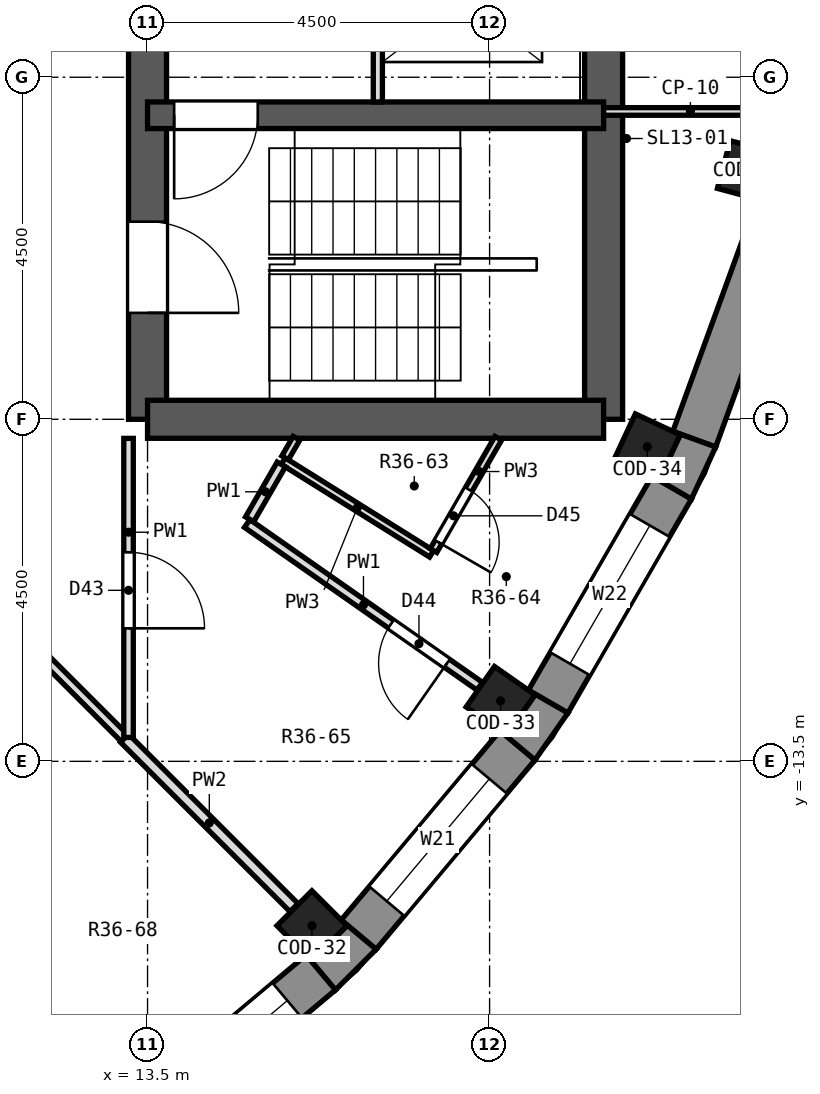
"""IFC4 building model, lengths in metres.
Left out: names, types, materials, properties, quantities, classifications, styles, units other than length and angle.
Written with IfcOpenShell. Run it as: python <this file> out.ifc"""

import sys

from ifc_helpers import new_model, si_unit, direction, frame, frame_2d, origin, origin_2d, place, context, subcontext, project, spatial, polyline, rectangle, outline, extrude, element, fill, save


model = new_model("IFC4")
c1 = context("Model", 3, precision=1e-05, world=origin(), true_north=direction((0.0, 1.0)))
c2 = subcontext(c1, "Body", "Model", "MODEL_VIEW")
j1 = project(units=[si_unit("LENGTHUNIT", "METRE"), si_unit("PLANEANGLEUNIT", "RADIAN")], contexts=[c1])
p1 = place(None, origin())
s1 = spatial("IfcSite", under=j1, at=p1, CompositionType="ELEMENT")
p2 = place(p1, origin())
s2 = spatial("IfcBuilding", under=s1, at=p2, CompositionType="ELEMENT")
p3 = place(p2, frame((0.0, 0.0, 259.4)))
s3 = spatial("IfcBuildingStorey", under=s2, at=p3, CompositionType="ELEMENT", Elevation=259.4)
for number, where, z_axis, x_axis in (
    (1, (15.662, -15.662, 0.0), (0.0, 0.0, 1.0), (0.707, -0.707, 0.0)),
    (2, (18.144, -12.705, 0.0), (0.0, 0.0, 1.0), (0.819, -0.574, 0.0)),
    (3, (20.075, -9.361, 0.0), (0.0, 0.0, 1.0), (0.906, -0.423, 0.0)),
    (4, (21.395, -5.733, 0.0), (0.0, 0.0, 1.0), (0.966, -0.259, 0.0)),
):
    element("IfcColumn", number, at=place(p3, frame(where, z_axis=z_axis, x_axis=x_axis)), inside=s3, PredefinedType="COLUMN", context=c2, shape_type="SweptSolid", body=[
        extrude(rectangle(XDim=0.65, YDim=0.65, at=origin_2d()), origin(), (0.0, 0.0, 1.0), 3.3),
    ])
p4 = place(p3, frame((13.5, -9.0, 0.0), z_axis=(0.0, 0.0, 1.0), x_axis=(0.0, 1.0, 0.0)))
e5 = element("IfcWall", 5, at=p4, inside=s3, PredefinedType="SHEAR", context=c2, shape_type="SweptSolid", body=[
    extrude(rectangle(XDim=18.0, YDim=0.5, at=frame_2d((9.0, 0.0))), origin(), (0.0, 0.0, 1.0), 3.3),
])
p5 = place(p4, frame((15.4, 0.0, 0.0)))
e6 = element("IfcOpeningElement", 6, at=p5, cuts=e5, PredefinedType="OPENING", context=c2, shape_type="SweptSolid", body=[
    extrude(rectangle(XDim=1.2, YDim=2.1, at=frame_2d((0.6, 1.05))), frame((0.0, 0.262, 0.0), z_axis=(0.0, -1.0, 0.0), x_axis=(1.0, 0.0, 0.0)), (0.0, 0.0, 1.0), 0.524),
])
p6 = place(p4, frame((1.4, 0.0, 0.0)))
e7 = element("IfcOpeningElement", 7, at=p6, cuts=e5, PredefinedType="OPENING", context=c2, shape_type="SweptSolid", body=[
    extrude(rectangle(XDim=1.2, YDim=2.1, at=frame_2d((0.6, 1.05))), frame((0.0, 0.262, 0.0), z_axis=(0.0, -1.0, 0.0), x_axis=(1.0, 0.0, 0.0)), (0.0, 0.0, 1.0), 0.524),
])
p7 = place(p4, frame((7.5, 0.0, 0.0)))
e8 = element("IfcOpeningElement", 8, at=p7, cuts=e5, PredefinedType="OPENING", context=c2, shape_type="SweptSolid", body=[
    extrude(rectangle(XDim=3.0, YDim=2.4, at=frame_2d((1.5, 1.2))), frame((0.0, 0.262, 0.0), z_axis=(0.0, -1.0, 0.0), x_axis=(1.0, 0.0, 0.0)), (0.0, 0.0, 1.0), 0.524),
])
p8 = place(p3, frame((19.5, -9.0, 0.0), z_axis=(0.0, 0.0, 1.0), x_axis=(0.0, 1.0, 0.0)))
e9 = element("IfcWall", 9, at=p8, inside=s3, PredefinedType="SHEAR", context=c2, shape_type="SweptSolid", body=[
    extrude(rectangle(XDim=18.0, YDim=0.5, at=frame_2d((9.0, 0.0))), origin(), (0.0, 0.0, 1.0), 3.3),
])
p9 = place(p8, frame((9.45, 0.0, 0.0)))
e10 = element("IfcOpeningElement", 10, at=p9, cuts=e9, PredefinedType="OPENING", context=c2, shape_type="SweptSolid", body=[
    extrude(rectangle(XDim=0.9, YDim=2.1, at=frame_2d((0.45, 1.05))), frame((0.0, 0.262, 0.0), z_axis=(0.0, -1.0, 0.0), x_axis=(1.0, 0.0, 0.0)), (0.0, 0.0, 1.0), 0.524),
])
p10 = place(p8, frame((7.65, 0.0, 0.0)))
e11 = element("IfcOpeningElement", 11, at=p10, cuts=e9, PredefinedType="OPENING", context=c2, shape_type="SweptSolid", body=[
    extrude(rectangle(XDim=0.9, YDim=2.1, at=frame_2d((0.45, 1.05))), frame((0.0, 0.262, 0.0), z_axis=(0.0, -1.0, 0.0), x_axis=(1.0, 0.0, 0.0)), (0.0, 0.0, 1.0), 0.524),
])
p11 = place(p3, frame((13.5, -9.0, 0.0), z_axis=(0.0, 0.0, 1.0), x_axis=(1.0, 0.0, 0.0)))
e12 = element("IfcWall", 12, at=p11, inside=s3, PredefinedType="SHEAR", context=c2, shape_type="SweptSolid", body=[
    extrude(rectangle(XDim=6.0, YDim=0.5, at=frame_2d((3.0, 0.0))), origin(), (0.0, 0.0, 1.0), 3.3),
])
p12 = place(p3, frame((13.5, -5.0, 0.0), z_axis=(0.0, 0.0, 1.0), x_axis=(1.0, 0.0, 0.0)))
e13 = element("IfcWall", 13, at=p12, inside=s3, PredefinedType="SHEAR", context=c2, shape_type="SweptSolid", body=[
    extrude(rectangle(XDim=6.0, YDim=0.35, at=frame_2d((3.0, 0.0))), origin(), (0.0, 0.0, 1.0), 3.3),
])
p13 = place(p12, frame((0.35, 0.0, 0.0)))
e14 = element("IfcOpeningElement", 14, at=p13, cuts=e13, PredefinedType="OPENING", context=c2, shape_type="SweptSolid", body=[
    extrude(rectangle(XDim=1.1, YDim=2.1, at=frame_2d((0.55, 1.05))), frame((0.0, 0.187, 0.0), z_axis=(0.0, -1.0, 0.0), x_axis=(1.0, 0.0, 0.0)), (0.0, 0.0, 1.0), 0.374),
])
p14 = place(p3, frame((13.29, -18.367, 0.0), z_axis=(0.0, 0.0, 1.0), x_axis=(0.766056773982, 0.64277291405, 0.0)))
e15 = element("IfcWall", 15, at=p14, inside=s3, PredefinedType="SOLIDWALL", context=c2, shape_type="SweptSolid", body=[
    extrude(rectangle(XDim=3.252, YDim=0.6, at=frame_2d((1.626, 0.0))), origin(), (0.0, 0.0, 1.0), 2.9),
])
p15 = place(p14, frame((0.576, 0.0, 0.9)))
e16 = element("IfcOpeningElement", 16, at=p15, cuts=e15, PredefinedType="OPENING", context=c2, shape_type="SweptSolid", body=[
    extrude(rectangle(XDim=2.1, YDim=1.8, at=frame_2d((1.05, 0.9))), frame((0.0, 0.312, 0.0), z_axis=(0.0, -1.0, 0.0), x_axis=(1.0, 0.0, 0.0)), (0.0, 0.0, 1.0), 0.624),
])
p16 = place(p3, frame((16.277, -15.781, 0.0), z_axis=(0.0, 0.0, 1.0), x_axis=(0.64277291405, 0.766056773982, 0.0)))
e17 = element("IfcWall", 17, at=p16, inside=s3, PredefinedType="SOLIDWALL", context=c2, shape_type="SweptSolid", body=[
    extrude(rectangle(XDim=3.252, YDim=0.6, at=frame_2d((1.626, 0.0))), origin(), (0.0, 0.0, 1.0), 2.9),
])
p17 = place(p16, frame((0.576, 0.0, 0.9)))
e18 = element("IfcOpeningElement", 18, at=p17, cuts=e17, PredefinedType="OPENING", context=c2, shape_type="SweptSolid", body=[
    extrude(rectangle(XDim=2.1, YDim=1.8, at=frame_2d((1.05, 0.9))), frame((0.0, 0.312, 0.0), z_axis=(0.0, -1.0, 0.0), x_axis=(1.0, 0.0, 0.0)), (0.0, 0.0, 1.0), 0.624),
])
p18 = place(p3, frame((18.77, -12.714, 0.0), z_axis=(0.0, 0.0, 1.0), x_axis=(0.500014901547, 0.866016800201, 0.0)))
e19 = element("IfcWall", 19, at=p18, inside=s3, PredefinedType="SOLIDWALL", context=c2, shape_type="SweptSolid", body=[
    extrude(rectangle(XDim=3.252, YDim=0.6, at=frame_2d((1.626, 0.0))), origin(), (0.0, 0.0, 1.0), 2.9),
])
p19 = place(p18, frame((0.576, 0.0, 0.9)))
e20 = element("IfcOpeningElement", 20, at=p19, cuts=e19, PredefinedType="OPENING", context=c2, shape_type="SweptSolid", body=[
    extrude(rectangle(XDim=2.1, YDim=1.8, at=frame_2d((1.05, 0.9))), frame((0.0, 0.312, 0.0), z_axis=(0.0, -1.0, 0.0), x_axis=(1.0, 0.0, 0.0)), (0.0, 0.0, 1.0), 0.624),
])
p20 = place(p3, frame((20.693, -9.262, 0.0), z_axis=(0.0, 0.0, 1.0), x_axis=(0.342056509473, 0.939679383794, 0.0)))
e21 = element("IfcWall", 21, at=p20, inside=s3, PredefinedType="SOLIDWALL", context=c2, shape_type="SweptSolid", body=[
    extrude(rectangle(XDim=3.252, YDim=0.6, at=frame_2d((1.626, 0.0))), origin(), (0.0, 0.0, 1.0), 2.9),
])
p21 = place(p3, origin())
e22 = element("IfcWall", 22, at=p21, inside=s3, PredefinedType="SOLIDWALL", context=c2, shape_type="SweptSolid", body=[
    extrude(outline(polyline([(16.507, -15.973), (16.047, -15.588), (16.122, -15.662), (15.662, -16.122), (15.588, -16.047), (15.973, -16.507), (16.507, -15.973)])), origin(), (0.0, 0.0, 1.0), 2.9),
])
p22 = place(p3, origin())
e23 = element("IfcWall", 23, at=p22, inside=s3, PredefinedType="SOLIDWALL", context=c2, shape_type="SweptSolid", body=[
    extrude(outline(polyline([(19.03, -12.864), (18.51, -12.564), (18.597, -12.625), (18.224, -13.157), (18.137, -13.097), (18.597, -13.482), (19.03, -12.864)])), origin(), (0.0, 0.0, 1.0), 2.9),
])
p23 = place(p3, origin())
e24 = element("IfcWall", 24, at=p23, inside=s3, PredefinedType="SOLIDWALL", context=c2, shape_type="SweptSolid", body=[
    extrude(outline(polyline([(20.656, -10.048), (20.975, -9.364), (20.411, -9.159), (20.507, -9.204), (20.232, -9.793), (20.136, -9.748), (20.656, -10.048)])), origin(), (0.0, 0.0, 1.0), 2.9),
])
p24 = place(p3, frame((8.275, -11.818, 0.0), z_axis=(0.0, 0.0, 1.0), x_axis=(0.573597629831, -0.819137204046, 0.0)))
e25 = element("IfcWall", 25, at=p24, inside=s3, PredefinedType="PARTITIONING", context=c2, shape_type="SweptSolid", body=[
    extrude(rectangle(XDim=7.388, YDim=0.1, at=frame_2d((3.694, 0.0))), origin(), (0.0, 0.0, 1.0), 2.9),
])
p25 = place(p24, frame((3.504, 0.0, 0.0)))
e26 = element("IfcOpeningElement", 26, at=p25, cuts=e25, PredefinedType="OPENING", context=c2, shape_type="SweptSolid", body=[
    extrude(rectangle(XDim=0.9, YDim=2.1, at=frame_2d((0.45, 1.05))), frame((0.0, 0.062, 0.0), z_axis=(0.0, -1.0, 0.0), x_axis=(1.0, 0.0, 0.0)), (0.0, 0.0, 1.0), 0.124),
])
p26 = place(p3, frame((10.477, -10.475, 0.0), z_axis=(0.0, 0.0, 1.0), x_axis=(0.707106781187, -0.707106781187, 0.0)))
e27 = element("IfcWall", 27, at=p26, inside=s3, PredefinedType="PARTITIONING", context=c2, shape_type="SweptSolid", body=[
    extrude(rectangle(XDim=3.848, YDim=0.125, at=frame_2d((1.924, 0.0))), origin(), (0.0, 0.0, 1.0), 2.9),
])
p27 = place(p3, frame((13.198, -13.196, 0.0), z_axis=(0.0, 0.0, 1.0), x_axis=(0.707261695581, -0.706951832845, 0.0)))
e28 = element("IfcWall", 28, at=p27, inside=s3, PredefinedType="PARTITIONING", context=c2, shape_type="SweptSolid", body=[
    extrude(rectangle(XDim=3.152, YDim=0.15, at=frame_2d((1.576, 0.0))), origin(), (0.0, 0.0, 1.0), 2.9),
])
p28 = place(p3, frame((14.811, -10.371, 0.0), z_axis=(0.0, 0.0, 1.0), x_axis=(0.819345561084, -0.57329996645, 0.0)))
e29 = element("IfcWall", 29, at=p28, inside=s3, PredefinedType="PARTITIONING", context=c2, shape_type="SweptSolid", body=[
    extrude(rectangle(XDim=3.734, YDim=0.125, at=frame_2d((1.867, 0.0))), origin(), (0.0, 0.0, 1.0), 2.9),
])
p29 = place(p28, frame((2.308, 0.0, 0.0)))
e30 = element("IfcOpeningElement", 30, at=p29, cuts=e29, PredefinedType="OPENING", context=c2, shape_type="SweptSolid", body=[
    extrude(rectangle(XDim=0.9, YDim=2.1, at=frame_2d((0.45, 1.05))), frame((0.0, 0.074, 0.0), z_axis=(0.0, -1.0, 0.0), x_axis=(1.0, 0.0, 0.0)), (0.0, 0.0, 1.0), 0.149),
])
p30 = place(p3, frame((15.285, -9.55, 0.0), z_axis=(0.0, 0.0, 1.0), x_axis=(0.848022135911, -0.529960807047, 0.0)))
e31 = element("IfcWall", 31, at=p30, inside=s3, PredefinedType="PARTITIONING", context=c2, shape_type="SweptSolid", body=[
    extrude(rectangle(XDim=2.302, YDim=0.1, at=frame_2d((1.151, 0.0))), origin(), (0.0, 0.0, 1.0), 2.9),
])
p31 = place(p3, frame((15.31, -9.507, 0.0), z_axis=(0.0, 0.0, 1.0), x_axis=(0.503206273965, 0.864166329963, 0.0)))
e32 = element("IfcWall", 32, at=p31, inside=s3, PredefinedType="PARTITIONING", context=c2, shape_type="SweptSolid", body=[
    extrude(rectangle(XDim=0.297, YDim=0.1, at=frame_2d((0.148, 0.0))), origin(), (0.0, 0.0, 1.0), 2.9),
])
p32 = place(p3, frame((17.262, -10.727, 0.0), z_axis=(0.0, 0.0, 1.0), x_axis=(0.499743113806, 0.866173666307, 0.0)))
e33 = element("IfcWall", 33, at=p32, inside=s3, PredefinedType="PARTITIONING", context=c2, shape_type="SweptSolid", body=[
    extrude(rectangle(XDim=1.705, YDim=0.1, at=frame_2d((0.853, 0.0))), origin(), (0.0, 0.0, 1.0), 2.9),
])
p33 = place(p32, frame((0.127, 0.0, 0.0)))
e34 = element("IfcOpeningElement", 34, at=p33, cuts=e33, PredefinedType="OPENING", context=c2, shape_type="SweptSolid", body=[
    extrude(rectangle(XDim=0.8, YDim=2.1, at=frame_2d((0.4, 1.05))), frame((0.0, 0.062, 0.0), z_axis=(0.0, -1.0, 0.0), x_axis=(1.0, 0.0, 0.0)), (0.0, 0.0, 1.0), 0.124),
])
p34 = place(p3, frame((14.843, -10.315, 0.0), z_axis=(0.0, 0.0, 1.0), x_axis=(0.499950631041, 0.86605390509, 0.0)))
e35 = element("IfcWall", 35, at=p34, inside=s3, PredefinedType="PARTITIONING", context=c2, shape_type="SweptSolid", body=[
    extrude(rectangle(XDim=0.833, YDim=0.125, at=frame_2d((0.417, 0.0))), origin(), (0.0, 0.0, 1.0), 2.9),
])
p35 = place(p3, frame((13.25, -13.186, 0.0), z_axis=(0.0, 0.0, 1.0), x_axis=(0.0, 1.0, 0.0)))
e36 = element("IfcWall", 36, at=p35, inside=s3, PredefinedType="PARTITIONING", context=c2, shape_type="SweptSolid", body=[
    extrude(rectangle(XDim=3.935, YDim=0.125, at=frame_2d((1.967, 0.0))), origin(), (0.0, 0.0, 1.0), 2.9),
])
p36 = place(p35, frame((1.436, 0.0, 0.0)))
e37 = element("IfcOpeningElement", 37, at=p36, cuts=e36, PredefinedType="OPENING", context=c2, shape_type="SweptSolid", body=[
    extrude(rectangle(XDim=1.0, YDim=2.1, at=frame_2d((0.5, 1.05))), frame((0.0, 0.074, 0.0), z_axis=(0.0, -1.0, 0.0), x_axis=(1.0, 0.0, 0.0)), (0.0, 0.0, 1.0), 0.149),
])
p37 = place(p3, frame((19.5, -4.95, 0.0), z_axis=(0.0, 0.0, 1.0), x_axis=(1.0, 0.0, 0.0)))
e38 = element("IfcWall", 38, at=p37, inside=s3, PredefinedType="PARTITIONING", context=c2, shape_type="SweptSolid", body=[
    extrude(rectangle(XDim=2.284, YDim=0.1, at=frame_2d((1.142, 0.0))), origin(), (0.0, 0.0, 1.0), 2.9),
])
p38 = place(p3, frame((16.53, -4.825, 0.0), z_axis=(0.0, 0.0, 1.0), x_axis=(0.0, 1.0, 0.0)))
e39 = element("IfcWall", 39, at=p38, inside=s3, PredefinedType="PARTITIONING", context=c2, shape_type="SweptSolid", body=[
    extrude(rectangle(XDim=2.65, YDim=0.12, at=frame_2d((1.325, 0.0))), origin(), (0.0, 0.0, 1.0), 2.9),
])
p39 = place(p38, frame((0.775, 0.0, 0.0)))
e40 = element("IfcOpeningElement", 40, at=p39, cuts=e39, PredefinedType="OPENING", context=c2, shape_type="SweptSolid", body=[
    extrude(rectangle(XDim=1.1, YDim=2.1, at=frame_2d((0.55, 1.05))), frame((0.0, 0.072, 0.0), z_axis=(0.0, -1.0, 0.0), x_axis=(1.0, 0.0, 0.0)), (0.0, 0.0, 1.0), 0.144),
])
p40 = place(p15, origin())
e41 = element("IfcWindow", 41, at=p40, inside=s3, PartitioningType="SINGLE_PANEL", PredefinedType="WINDOW", context=c2, shape_type="SweptSolid", body=[
    extrude(rectangle(XDim=2.1, YDim=1.8, at=frame_2d((1.05, 0.9))), frame((0.0, 0.18, 0.0), z_axis=(0.0, -1.0, 0.0), x_axis=(1.0, 0.0, 0.0)), (0.0, 0.0, 1.0), 0.06),
])
fill(e16, e41)
p41 = place(p17, origin())
e42 = element("IfcWindow", 42, at=p41, inside=s3, PartitioningType="SINGLE_PANEL", PredefinedType="WINDOW", context=c2, shape_type="SweptSolid", body=[
    extrude(rectangle(XDim=2.1, YDim=1.8, at=frame_2d((1.05, 0.9))), frame((0.0, 0.18, 0.0), z_axis=(0.0, -1.0, 0.0), x_axis=(1.0, 0.0, 0.0)), (0.0, 0.0, 1.0), 0.06),
])
fill(e18, e42)
p42 = place(p19, origin())
e43 = element("IfcWindow", 43, at=p42, inside=s3, PartitioningType="SINGLE_PANEL", PredefinedType="WINDOW", context=c2, shape_type="SweptSolid", body=[
    extrude(rectangle(XDim=2.1, YDim=1.8, at=frame_2d((1.05, 0.9))), frame((0.0, 0.18, 0.0), z_axis=(0.0, -1.0, 0.0), x_axis=(1.0, 0.0, 0.0)), (0.0, 0.0, 1.0), 0.06),
])
fill(e20, e43)
p43 = place(p36, frame((1.0, 0.0, 0.0), z_axis=(0.0, 0.0, 1.0), x_axis=(-1.0, 0.0, 0.0)))
e44 = element("IfcDoor", 44, at=p43, inside=s3, OperationType="SINGLE_SWING_RIGHT", PredefinedType="DOOR", context=c2, shape_type="SweptSolid", body=[
    extrude(rectangle(XDim=1.0, YDim=2.1, at=frame_2d((0.5, 1.05))), frame((0.0, 0.025, 0.0), z_axis=(0.0, -1.0, 0.0), x_axis=(1.0, 0.0, 0.0)), (0.0, 0.0, 1.0), 0.05),
])
fill(e37, e44)
p44 = place(p29, frame((0.9, 0.0, 0.0), z_axis=(0.0, 0.0, 1.0), x_axis=(-1.0, 0.0, 0.0)))
e45 = element("IfcDoor", 45, at=p44, inside=s3, OperationType="SINGLE_SWING_LEFT", PredefinedType="DOOR", context=c2, shape_type="SweptSolid", body=[
    extrude(rectangle(XDim=0.9, YDim=2.1, at=frame_2d((0.45, 1.05))), frame((0.0, 0.025, 0.0), z_axis=(0.0, -1.0, 0.0), x_axis=(1.0, 0.0, 0.0)), (0.0, 0.0, 1.0), 0.05),
])
fill(e30, e45)
p45 = place(p33, frame((0.8, 0.0, 0.0), z_axis=(0.0, 0.0, 1.0), x_axis=(-1.0, 0.0, 0.0)))
e46 = element("IfcDoor", 46, at=p45, inside=s3, OperationType="SINGLE_SWING_RIGHT", PredefinedType="DOOR", context=c2, shape_type="SweptSolid", body=[
    extrude(rectangle(XDim=0.8, YDim=2.1, at=frame_2d((0.4, 1.05))), frame((0.0, 0.025, 0.0), z_axis=(0.0, -1.0, 0.0), x_axis=(1.0, 0.0, 0.0)), (0.0, 0.0, 1.0), 0.05),
])
fill(e34, e46)
p46 = place(p13, frame((1.1, 0.0, 0.0), z_axis=(0.0, 0.0, 1.0), x_axis=(-1.0, 0.0, 0.0)))
e47 = element("IfcDoor", 47, at=p46, inside=s3, OperationType="SINGLE_SWING_RIGHT", PredefinedType="DOOR", context=c2, shape_type="SweptSolid", body=[
    extrude(rectangle(XDim=1.1, YDim=2.1, at=frame_2d((0.55, 1.05))), frame((0.0, 0.025, 0.0), z_axis=(0.0, -1.0, 0.0), x_axis=(1.0, 0.0, 0.0)), (0.0, 0.0, 1.0), 0.05),
])
fill(e14, e47)
p47 = place(p6, frame((1.2, 0.0, 0.0), z_axis=(0.0, 0.0, 1.0), x_axis=(-1.0, 0.0, 0.0)))
e48 = element("IfcDoor", 48, at=p47, inside=s3, OperationType="SINGLE_SWING_RIGHT", PredefinedType="DOOR", context=c2, shape_type="SweptSolid", body=[
    extrude(rectangle(XDim=1.2, YDim=2.1, at=frame_2d((0.6, 1.05))), frame((0.0, 0.025, 0.0), z_axis=(0.0, -1.0, 0.0), x_axis=(1.0, 0.0, 0.0)), (0.0, 0.0, 1.0), 0.05),
])
fill(e7, e48)
save(model, sys.argv[1])
